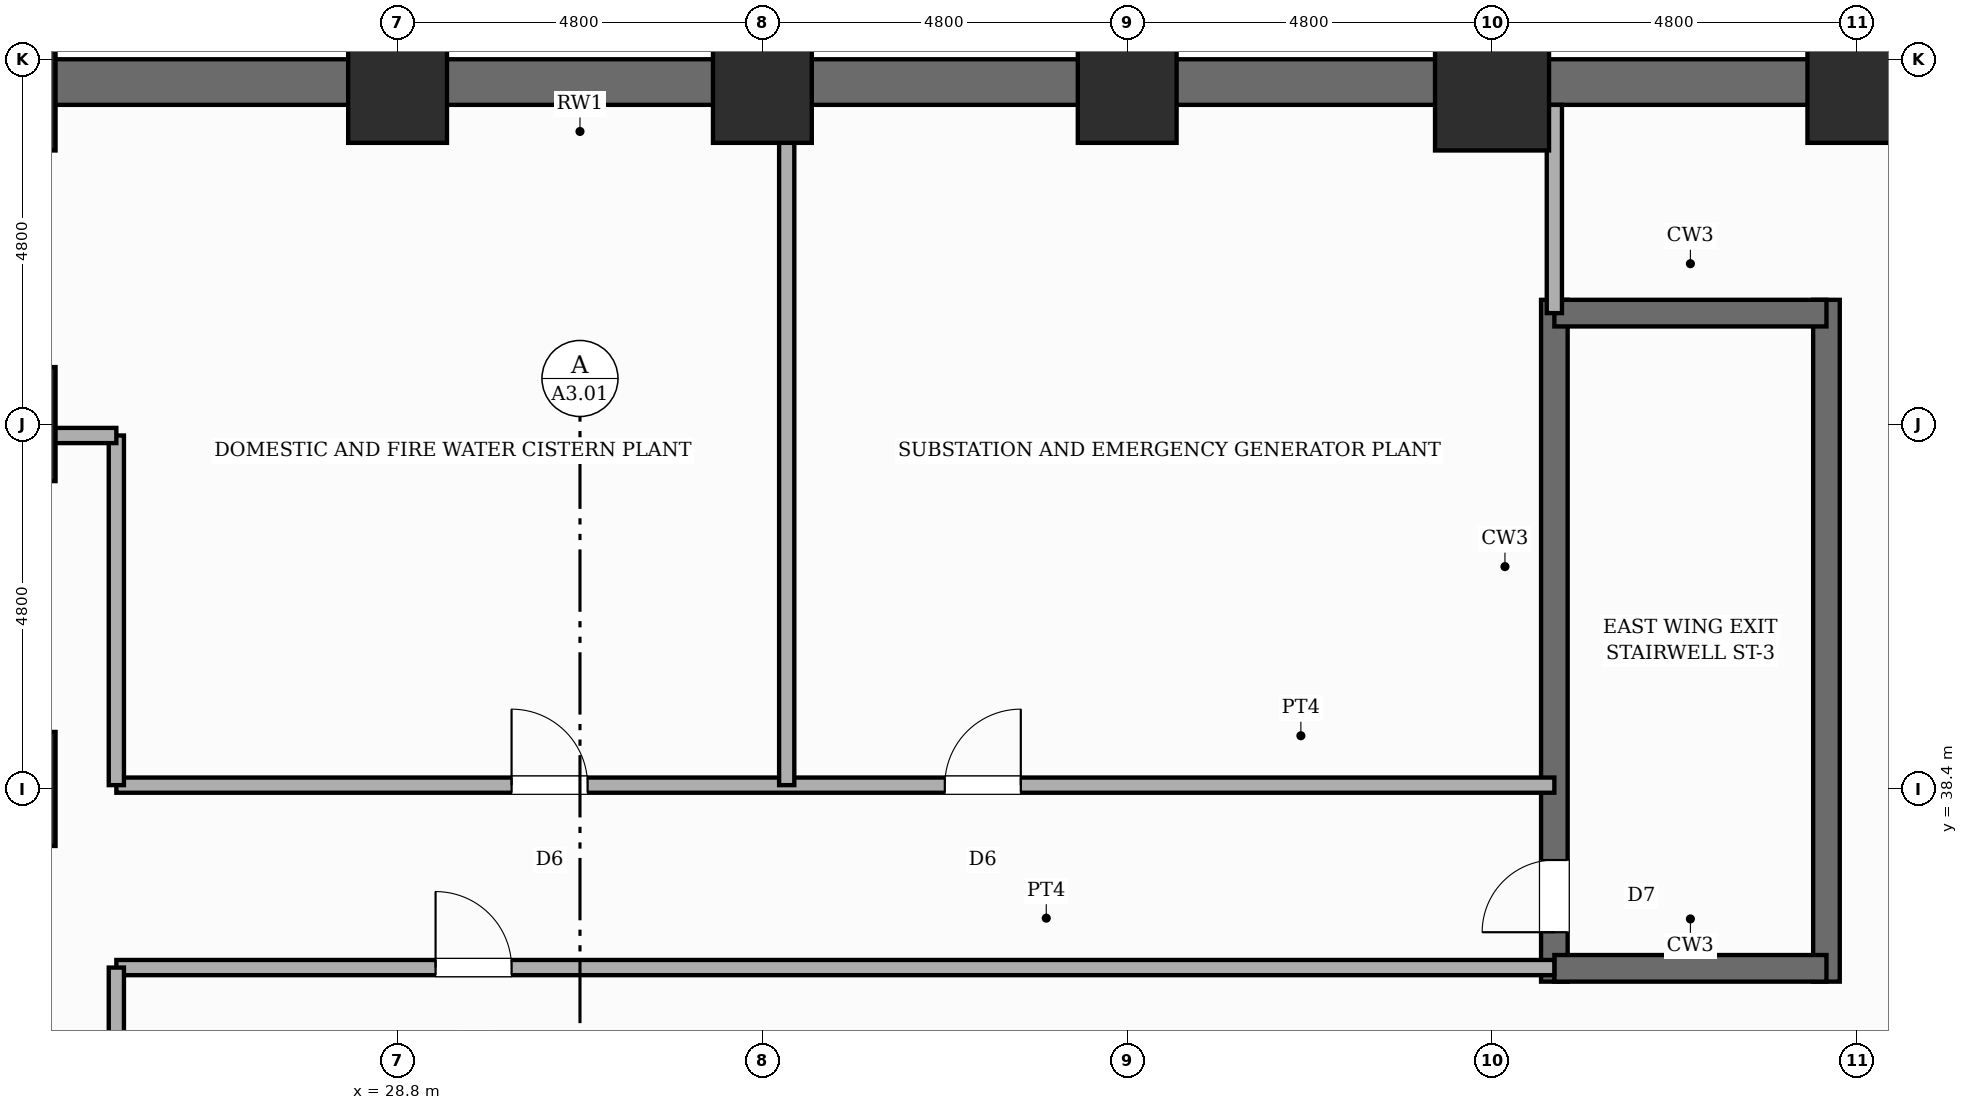
"""IFC4 building model, lengths in metres.
Left out: names, types, materials, properties, quantities, classifications, styles, units other than length and angle.
Written with IfcOpenShell. Run it as: python <this file> out.ifc"""

import sys

from ifc_helpers import new_model, si_unit, direction, frame, frame_2d, origin, origin_2d, place, context, subcontext, project, spatial, rectangle, extrude, element, fill, save


model = new_model("IFC4")
c1 = context("Model", 3, precision=1e-05, world=origin(), true_north=direction((0.0, 1.0)))
c2 = subcontext(c1, "Body", "Model", "MODEL_VIEW")
j1 = project(units=[si_unit("LENGTHUNIT", "METRE"), si_unit("PLANEANGLEUNIT", "RADIAN")], contexts=[c1])
p1 = place(None, origin())
s1 = spatial("IfcSite", under=j1, at=p1, CompositionType="ELEMENT")
p2 = place(p1, origin())
s2 = spatial("IfcBuilding", under=s1, at=p2, CompositionType="ELEMENT")
p3 = place(p2, frame((0.0, 0.0, -13.2)))
s3 = spatial("IfcBuildingStorey", under=s2, at=p3, CompositionType="ELEMENT", Elevation=-13.2)
p4 = place(p3, frame((62.1, 47.7, 0.0), z_axis=(0.0, 0.0, 1.0), x_axis=(-1.0, 0.0, 0.0)))
e1 = element("IfcWall", 1, at=p4, inside=s3, PredefinedType="USERDEFINED", context=c2, shape_type="SweptSolid", body=[
    extrude(rectangle(XDim=61.8, YDim=0.6, at=frame_2d((30.9, 0.0))), origin(), (0.0, 0.0, 1.0), 4.4),
])
p5 = place(p3, frame((44.02, 35.865, 0.0), z_axis=(0.0, 0.0, 1.0), x_axis=(0.0, 1.0, 0.0)))
e2 = element("IfcWall", 2, at=p5, inside=s3, PredefinedType="SHEAR", context=c2, shape_type="SweptSolid", body=[
    extrude(rectangle(XDim=8.97, YDim=0.35, at=frame_2d((4.485, 0.0))), origin(), (0.0, 0.0, 1.0), 4.4),
])
p6 = place(p5, frame((0.65, 0.0, 0.0)))
e3 = element("IfcOpeningElement", 3, at=p6, cuts=e2, PredefinedType="OPENING", context=c2, shape_type="SweptSolid", body=[
    extrude(rectangle(XDim=0.95, YDim=2.1, at=frame_2d((0.475, 1.05))), frame((0.0, 0.185, 0.0), z_axis=(0.0, -1.0, 0.0), x_axis=(1.0, 0.0, 0.0)), (0.0, 0.0, 1.0), 0.37),
])
p7 = place(p3, frame((47.6, 35.865, 0.0), z_axis=(0.0, 0.0, 1.0), x_axis=(0.0, 1.0, 0.0)))
e4 = element("IfcWall", 4, at=p7, inside=s3, PredefinedType="SHEAR", context=c2, shape_type="SweptSolid", body=[
    extrude(rectangle(XDim=8.97, YDim=0.35, at=frame_2d((4.485, 0.0))), origin(), (0.0, 0.0, 1.0), 4.4),
])
for number, where, z_axis, x_axis in (
    (5, (44.02, 36.04, 0.0), (0.0, 0.0, 1.0), (1.0, 0.0, 0.0)),
    (6, (44.02, 44.66, 0.0), (0.0, 0.0, 1.0), (1.0, 0.0, 0.0)),
):
    element("IfcWall", number, at=place(p3, frame(where, z_axis=z_axis, x_axis=x_axis)), inside=s3, PredefinedType="SHEAR", context=c2, shape_type="SweptSolid", body=[
        extrude(rectangle(XDim=3.58, YDim=0.35, at=frame_2d((1.79, 0.0))), origin(), (0.0, 0.0, 1.0), 4.4),
    ])
for number, where, z_axis, x_axis in (
    (7, (23.55, 38.4, 0.0), (0.0, 0.0, 1.0), (1.0, 0.0, 0.0)),
    (8, (23.55, 43.2, 0.0), (0.0, 0.0, 1.0), (1.0, 0.0, 0.0)),
    (9, (23.55, 47.55, 0.0), (0.0, 0.0, 1.0), (1.0, 0.0, 0.0)),
):
    element("IfcColumn", number, at=place(p3, frame(where, z_axis=z_axis, x_axis=x_axis)), inside=s3, PredefinedType="USERDEFINED", context=c2, shape_type="SweptSolid", body=[
        extrude(rectangle(XDim=1.5, YDim=1.5, at=origin_2d()), origin(), (0.0, 0.0, 1.0), 4.4),
    ])
for number, where, z_axis, x_axis in (
    (10, (28.8, 47.55, 0.0), (0.0, 0.0, 1.0), (1.0, 0.0, 0.0)),
    (11, (33.6, 47.55, 0.0), (0.0, 0.0, 1.0), (1.0, 0.0, 0.0)),
    (12, (38.4, 47.55, 0.0), (0.0, 0.0, 1.0), (1.0, 0.0, 0.0)),
):
    element("IfcColumn", number, at=place(p3, frame(where, z_axis=z_axis, x_axis=x_axis)), inside=s3, PredefinedType="COLUMN", context=c2, shape_type="SweptSolid", body=[
        extrude(rectangle(XDim=1.3, YDim=1.3, at=origin_2d()), origin(), (0.0, 0.0, 1.0), 4.4),
    ])
p8 = place(p3, frame((43.2, 47.55, 0.0), z_axis=(0.0, 0.0, 1.0), x_axis=(1.0, 0.0, 0.0)))
e13 = element("IfcColumn", 13, at=p8, inside=s3, PredefinedType="USERDEFINED", context=c2, shape_type="SweptSolid", body=[
    extrude(rectangle(XDim=1.5, YDim=1.5, at=origin_2d()), origin(), (0.0, 0.0, 1.0), 4.4),
])
p9 = place(p3, frame((48.0, 47.55, 0.0), z_axis=(0.0, 0.0, 1.0), x_axis=(1.0, 0.0, 0.0)))
e14 = element("IfcColumn", 14, at=p9, inside=s3, PredefinedType="COLUMN", context=c2, shape_type="SweptSolid", body=[
    extrude(rectangle(XDim=1.3, YDim=1.3, at=origin_2d()), origin(), (0.0, 0.0, 1.0), 4.4),
])
p10 = place(p3, frame((25.1, 36.05, 0.0), z_axis=(0.0, 0.0, 1.0), x_axis=(1.0, 0.0, 0.0)))
e15 = element("IfcWall", 15, at=p10, inside=s3, PredefinedType="PARTITIONING", context=c2, shape_type="SweptSolid", body=[
    extrude(rectangle(XDim=18.92, YDim=0.2, at=frame_2d((9.46, 0.0))), origin(), (0.0, 0.0, 1.0), 4.08),
])
p11 = place(p10, frame((4.2, 0.0, 0.0)))
e16 = element("IfcOpeningElement", 16, at=p11, cuts=e15, PredefinedType="OPENING", context=c2, shape_type="SweptSolid", body=[
    extrude(rectangle(XDim=1.0, YDim=2.15, at=frame_2d((0.5, 1.075))), frame((0.0, 0.11, 0.0), z_axis=(0.0, -1.0, 0.0), x_axis=(1.0, 0.0, 0.0)), (0.0, 0.0, 1.0), 0.22),
])
p12 = place(p3, frame((25.1, 38.45, 0.0), z_axis=(0.0, 0.0, 1.0), x_axis=(1.0, 0.0, 0.0)))
e17 = element("IfcWall", 17, at=p12, inside=s3, PredefinedType="PARTITIONING", context=c2, shape_type="SweptSolid", body=[
    extrude(rectangle(XDim=18.92, YDim=0.2, at=frame_2d((9.46, 0.0))), origin(), (0.0, 0.0, 1.0), 4.08),
])
p13 = place(p12, frame((5.2, 0.0, 0.0)))
e18 = element("IfcOpeningElement", 18, at=p13, cuts=e17, PredefinedType="OPENING", context=c2, shape_type="SweptSolid", body=[
    extrude(rectangle(XDim=1.0, YDim=2.15, at=frame_2d((0.5, 1.075))), frame((0.0, 0.11, 0.0), z_axis=(0.0, -1.0, 0.0), x_axis=(1.0, 0.0, 0.0)), (0.0, 0.0, 1.0), 0.22),
])
p14 = place(p12, frame((10.9, 0.0, 0.0)))
e19 = element("IfcOpeningElement", 19, at=p14, cuts=e17, PredefinedType="OPENING", context=c2, shape_type="SweptSolid", body=[
    extrude(rectangle(XDim=1.0, YDim=2.15, at=frame_2d((0.5, 1.075))), frame((0.0, 0.11, 0.0), z_axis=(0.0, -1.0, 0.0), x_axis=(1.0, 0.0, 0.0)), (0.0, 0.0, 1.0), 0.22),
])
p15 = place(p3, frame((25.1, 25.8, 0.0), z_axis=(0.0, 0.0, 1.0), x_axis=(0.0, 1.0, 0.0)))
e20 = element("IfcWall", 20, at=p15, inside=s3, PredefinedType="PARTITIONING", context=c2, shape_type="SweptSolid", body=[
    extrude(rectangle(XDim=10.25, YDim=0.2, at=frame_2d((5.125, 0.0))), origin(), (0.0, 0.0, 1.0), 4.08),
])
p16 = place(p3, frame((25.1, 38.45, 0.0), z_axis=(0.0, 0.0, 1.0), x_axis=(0.0, 1.0, 0.0)))
e21 = element("IfcWall", 21, at=p16, inside=s3, PredefinedType="PARTITIONING", context=c2, shape_type="SweptSolid", body=[
    extrude(rectangle(XDim=4.6, YDim=0.2, at=frame_2d((2.3, 0.0))), origin(), (0.0, 0.0, 1.0), 4.08),
])
p17 = place(p3, frame((22.75, 43.05, 0.0), z_axis=(0.0, 0.0, 1.0), x_axis=(1.0, 0.0, 0.0)))
e22 = element("IfcWall", 22, at=p17, inside=s3, PredefinedType="PARTITIONING", context=c2, shape_type="SweptSolid", body=[
    extrude(rectangle(XDim=2.35, YDim=0.2, at=frame_2d((1.175, 0.0))), origin(), (0.0, 0.0, 1.0), 3.28),
])
p18 = place(p3, frame((33.92, 38.45, 0.0), z_axis=(0.0, 0.0, 1.0), x_axis=(0.0, 1.0, 0.0)))
e23 = element("IfcWall", 23, at=p18, inside=s3, PredefinedType="PARTITIONING", context=c2, shape_type="SweptSolid", body=[
    extrude(rectangle(XDim=8.95, YDim=0.2, at=frame_2d((4.475, 0.0))), origin(), (0.0, 0.0, 1.0), 3.28),
])
p19 = place(p3, frame((44.02, 44.66, 0.0), z_axis=(0.0, 0.0, 1.0), x_axis=(0.0, 1.0, 0.0)))
e24 = element("IfcWall", 24, at=p19, inside=s3, PredefinedType="PARTITIONING", context=c2, shape_type="SweptSolid", body=[
    extrude(rectangle(XDim=2.74, YDim=0.2, at=frame_2d((1.37, 0.0))), origin(), (0.0, 0.0, 1.0), 4.08),
])
p20 = place(p6, origin())
e25 = element("IfcDoor", 25, at=p20, inside=s3, OperationType="SINGLE_SWING_LEFT", PredefinedType="DOOR", context=c2, shape_type="SweptSolid", body=[
    extrude(rectangle(XDim=0.95, YDim=2.1, at=frame_2d((0.475, 1.05))), frame((0.0, 0.025, 0.0), z_axis=(0.0, -1.0, 0.0), x_axis=(1.0, 0.0, 0.0)), (0.0, 0.0, 1.0), 0.05),
])
fill(e3, e25)
p21 = place(p11, origin())
e26 = element("IfcDoor", 26, at=p21, inside=s3, OperationType="SINGLE_SWING_LEFT", PredefinedType="DOOR", context=c2, shape_type="SweptSolid", body=[
    extrude(rectangle(XDim=1.0, YDim=2.15, at=frame_2d((0.5, 1.075))), frame((0.0, 0.025, 0.0), z_axis=(0.0, -1.0, 0.0), x_axis=(1.0, 0.0, 0.0)), (0.0, 0.0, 1.0), 0.05),
])
fill(e16, e26)
p22 = place(p13, origin())
e27 = element("IfcDoor", 27, at=p22, inside=s3, OperationType="SINGLE_SWING_LEFT", PredefinedType="DOOR", context=c2, shape_type="SweptSolid", body=[
    extrude(rectangle(XDim=1.0, YDim=2.15, at=frame_2d((0.5, 1.075))), frame((0.0, 0.025, 0.0), z_axis=(0.0, -1.0, 0.0), x_axis=(1.0, 0.0, 0.0)), (0.0, 0.0, 1.0), 0.05),
])
fill(e18, e27)
p23 = place(p14, origin())
e28 = element("IfcDoor", 28, at=p23, inside=s3, OperationType="SINGLE_SWING_RIGHT", PredefinedType="DOOR", context=c2, shape_type="SweptSolid", body=[
    extrude(rectangle(XDim=1.0, YDim=2.15, at=frame_2d((0.5, 1.075))), frame((0.0, 0.025, 0.0), z_axis=(0.0, -1.0, 0.0), x_axis=(1.0, 0.0, 0.0)), (0.0, 0.0, 1.0), 0.05),
])
fill(e19, e28)
save(model, sys.argv[1])
